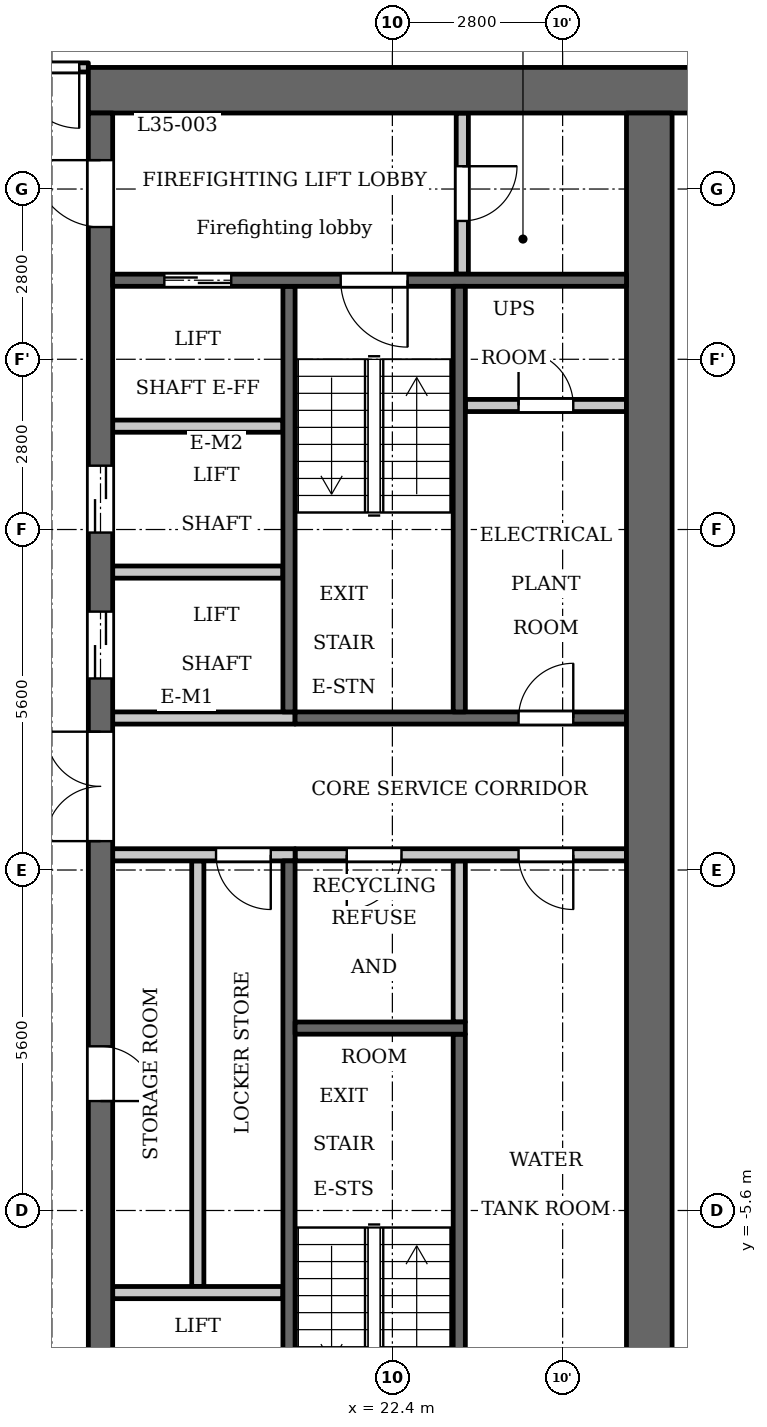
"""IFC4 building model, lengths in metres.
Left out: names, types, materials, properties, quantities, classifications, styles, units other than length and angle.
Written with IfcOpenShell. Run it as: python <this file> out.ifc"""

import sys

from ifc_helpers import new_model, si_unit, direction, frame, frame_2d, origin, place, context, subcontext, project, spatial, rectangle, extrude, element, fill, save


model = new_model("IFC4")
c1 = context("Model", 3, precision=1e-05, world=origin(), true_north=direction((0.0, 1.0)))
c2 = subcontext(c1, "Body", "Model", "MODEL_VIEW")
j1 = project(units=[si_unit("LENGTHUNIT", "METRE"), si_unit("PLANEANGLEUNIT", "RADIAN")], contexts=[c1])
p1 = place(None, origin())
s1 = spatial("IfcSite", under=j1, at=p1, CompositionType="ELEMENT")
p2 = place(p1, origin())
s2 = spatial("IfcBuilding", under=s1, at=p2, CompositionType="ELEMENT")
p3 = place(p2, frame((0.0, 0.0, 139.6)))
s3 = spatial("IfcBuildingStorey", under=s2, at=p3, CompositionType="ELEMENT", Elevation=139.6)
p4 = place(p3, frame((23.5, -2.5, 0.0), z_axis=(0.0, 0.0, 1.0), x_axis=(0.0, 1.0, 0.0)))
e1 = element("IfcWall", 1, at=p4, inside=s3, PredefinedType="PARTITIONING", context=c2, shape_type="SweptSolid", body=[
    extrude(rectangle(XDim=2.65, YDim=0.2, at=frame_2d((1.325, 0.0))), origin(), (0.0, 0.0, 1.0), 3.2),
])
p5 = place(p3, frame((20.7, 2.6, 0.0), z_axis=(0.0, 0.0, 1.0), x_axis=(0.0, 1.0, 0.0)))
e2 = element("IfcWall", 2, at=p5, inside=s3, PredefinedType="SHEAR", context=c2, shape_type="SweptSolid", body=[
    extrude(rectangle(XDim=7.0, YDim=0.2, at=frame_2d((3.5, 0.0))), origin(), (0.0, 0.0, 1.0), 3.2),
])
p6 = place(p3, frame((20.7, -9.6, 0.0), z_axis=(0.0, 0.0, 1.0), x_axis=(0.0, 1.0, 0.0)))
e3 = element("IfcWall", 3, at=p6, inside=s3, PredefinedType="SHEAR", context=c2, shape_type="SweptSolid", body=[
    extrude(rectangle(XDim=9.75, YDim=0.2, at=frame_2d((4.875, 0.0))), origin(), (0.0, 0.0, 1.0), 3.2),
])
p7 = place(p3, frame((20.8, 2.5, 0.0), z_axis=(0.0, 0.0, 1.0), x_axis=(1.0, 0.0, 0.0)))
e4 = element("IfcWall", 4, at=p7, inside=s3, PredefinedType="SHEAR", context=c2, shape_type="SweptSolid", body=[
    extrude(rectangle(XDim=5.45, YDim=0.2, at=frame_2d((2.725, 0.0))), origin(), (0.0, 0.0, 1.0), 3.2),
])
p8 = place(p7, frame((3.675, 0.0, 0.0)))
e5 = element("IfcOpeningElement", 5, at=p8, cuts=e4, PredefinedType="OPENING", context=c2, shape_type="SweptSolid", body=[
    extrude(rectangle(XDim=0.9, YDim=2.1, at=frame_2d((0.45, 1.05))), frame((0.0, 0.11, 0.0), z_axis=(0.0, -1.0, 0.0), x_axis=(1.0, 0.0, 0.0)), (0.0, 0.0, 1.0), 0.22),
])
p9 = place(p3, frame((20.8, 0.25, 0.0), z_axis=(0.0, 0.0, 1.0), x_axis=(1.0, 0.0, 0.0)))
e6 = element("IfcWall", 6, at=p9, inside=s3, PredefinedType="PARTITIONING", context=c2, shape_type="SweptSolid", body=[
    extrude(rectangle(XDim=5.45, YDim=0.2, at=frame_2d((2.725, 0.0))), origin(), (0.0, 0.0, 1.0), 3.2),
])
p10 = place(p9, frame((0.85, 0.0, 0.0)))
e7 = element("IfcOpeningElement", 7, at=p10, cuts=e6, PredefinedType="OPENING", context=c2, shape_type="SweptSolid", body=[
    extrude(rectangle(XDim=0.9, YDim=2.1, at=frame_2d((0.45, 1.05))), frame((0.0, 0.11, 0.0), z_axis=(0.0, -1.0, 0.0), x_axis=(1.0, 0.0, 0.0)), (0.0, 0.0, 1.0), 0.22),
])
p11 = place(p9, frame((3.675, 0.0, 0.0)))
e8 = element("IfcOpeningElement", 8, at=p11, cuts=e6, PredefinedType="OPENING", context=c2, shape_type="SweptSolid", body=[
    extrude(rectangle(XDim=0.9, YDim=2.1, at=frame_2d((0.45, 1.05))), frame((0.0, 0.11, 0.0), z_axis=(0.0, -1.0, 0.0), x_axis=(1.0, 0.0, 0.0)), (0.0, 0.0, 1.0), 0.22),
])
p12 = place(p3, frame((17.4, 12.825, 0.0), z_axis=(0.0, 0.0, 1.0), x_axis=(1.0, 0.0, 0.0)))
e9 = element("IfcWall", 9, at=p12, inside=s3, PredefinedType="SHEAR", context=c2, shape_type="SweptSolid", body=[
    extrude(rectangle(XDim=10.4, YDim=0.75, at=frame_2d((5.2, 0.0))), origin(), (0.0, 0.0, 1.0), 3.2),
])
p13 = place(p3, frame((19.2, -6.85, 0.0), z_axis=(0.0, 0.0, 1.0), x_axis=(0.0, 1.0, 0.0)))
e10 = element("IfcWall", 10, at=p13, inside=s3, PredefinedType="PARTITIONING", context=c2, shape_type="SweptSolid", body=[
    extrude(rectangle(XDim=7.0, YDim=0.2, at=frame_2d((3.5, 0.0))), origin(), (0.0, 0.0, 1.0), 3.2),
])
p14 = place(p3, frame((17.6, -12.45, 0.0), z_axis=(0.0, 0.0, 1.0), x_axis=(0.0, 1.0, 0.0)))
e11 = element("IfcWall", 11, at=p14, inside=s3, PredefinedType="SHEAR", context=c2, shape_type="SweptSolid", body=[
    extrude(rectangle(XDim=24.9, YDim=0.4, at=frame_2d((12.45, 0.0))), origin(), (0.0, 0.0, 1.0), 3.2),
])
p15 = place(p14, frame((8.65, 0.0, 0.0)))
e12 = element("IfcOpeningElement", 12, at=p15, cuts=e11, PredefinedType="OPENING", context=c2, shape_type="SweptSolid", body=[
    extrude(rectangle(XDim=0.9, YDim=2.1, at=frame_2d((0.45, 1.05))), frame((0.0, 0.21, 0.0), z_axis=(0.0, -1.0, 0.0), x_axis=(1.0, 0.0, 0.0)), (0.0, 0.0, 1.0), 0.42),
])
p16 = place(p14, frame((15.6, 0.0, 0.0)))
e13 = element("IfcOpeningElement", 13, at=p16, cuts=e11, PredefinedType="OPENING", context=c2, shape_type="SweptSolid", body=[
    extrude(rectangle(XDim=1.1, YDim=2.1, at=frame_2d((0.55, 1.05))), frame((0.0, 0.21, 0.0), z_axis=(0.0, -1.0, 0.0), x_axis=(1.0, 0.0, 0.0)), (0.0, 0.0, 1.0), 0.42),
])
p17 = place(p14, frame((18.0, 0.0, 0.0)))
e14 = element("IfcOpeningElement", 14, at=p17, cuts=e11, PredefinedType="OPENING", context=c2, shape_type="SweptSolid", body=[
    extrude(rectangle(XDim=1.1, YDim=2.1, at=frame_2d((0.55, 1.05))), frame((0.0, 0.21, 0.0), z_axis=(0.0, -1.0, 0.0), x_axis=(1.0, 0.0, 0.0)), (0.0, 0.0, 1.0), 0.42),
])
p18 = place(p14, frame((23.025, 0.0, 0.0)))
e15 = element("IfcOpeningElement", 15, at=p18, cuts=e11, PredefinedType="OPENING", context=c2, shape_type="SweptSolid", body=[
    extrude(rectangle(XDim=1.1, YDim=2.1, at=frame_2d((0.55, 1.05))), frame((0.0, 0.21, 0.0), z_axis=(0.0, -1.0, 0.0), x_axis=(1.0, 0.0, 0.0)), (0.0, 0.0, 1.0), 0.42),
])
p19 = place(p14, frame((0.775, 0.0, 0.0)))
e16 = element("IfcOpeningElement", 16, at=p19, cuts=e11, PredefinedType="OPENING", context=c2, shape_type="SweptSolid", body=[
    extrude(rectangle(XDim=1.1, YDim=2.1, at=frame_2d((0.55, 1.05))), frame((0.0, 0.21, 0.0), z_axis=(0.0, -1.0, 0.0), x_axis=(1.0, 0.0, 0.0)), (0.0, 0.0, 1.0), 0.42),
])
p20 = place(p14, frame((12.925, 0.0, 0.0)))
e17 = element("IfcOpeningElement", 17, at=p20, cuts=e11, PredefinedType="OPENING", context=c2, shape_type="SweptSolid", body=[
    extrude(rectangle(XDim=1.8, YDim=2.1, at=frame_2d((0.9, 1.05))), frame((0.0, 0.21, 0.0), z_axis=(0.0, -1.0, 0.0), x_axis=(1.0, 0.0, 0.0)), (0.0, 0.0, 1.0), 0.42),
])
p21 = place(p3, frame((26.625, -12.45, 0.0), z_axis=(0.0, 0.0, 1.0), x_axis=(0.0, 1.0, 0.0)))
e18 = element("IfcWall", 18, at=p21, inside=s3, PredefinedType="SHEAR", context=c2, shape_type="SweptSolid", body=[
    extrude(rectangle(XDim=24.9, YDim=0.75, at=frame_2d((12.45, 0.0))), origin(), (0.0, 0.0, 1.0), 3.2),
])
p22 = place(p3, frame((23.55, 9.8, 0.0), z_axis=(0.0, 0.0, 1.0), x_axis=(0.0, 1.0, 0.0)))
e19 = element("IfcWall", 19, at=p22, inside=s3, PredefinedType="PARTITIONING", context=c2, shape_type="SweptSolid", body=[
    extrude(rectangle(XDim=2.65, YDim=0.2, at=frame_2d((1.325, 0.0))), origin(), (0.0, 0.0, 1.0), 3.2),
])
p23 = place(p22, frame((0.875, 0.0, 0.0)))
e20 = element("IfcOpeningElement", 20, at=p23, cuts=e19, PredefinedType="OPENING", context=c2, shape_type="SweptSolid", body=[
    extrude(rectangle(XDim=0.9, YDim=2.1, at=frame_2d((0.45, 1.05))), frame((0.0, 0.11, 0.0), z_axis=(0.0, -1.0, 0.0), x_axis=(1.0, 0.0, 0.0)), (0.0, 0.0, 1.0), 0.22),
])
p24 = place(p3, frame((23.6, 7.64, 0.0), z_axis=(0.0, 0.0, 1.0), x_axis=(1.0, 0.0, 0.0)))
e21 = element("IfcWall", 21, at=p24, inside=s3, PredefinedType="PARTITIONING", context=c2, shape_type="SweptSolid", body=[
    extrude(rectangle(XDim=2.65, YDim=0.2, at=frame_2d((1.325, 0.0))), origin(), (0.0, 0.0, 1.0), 3.2),
])
p25 = place(p24, frame((0.875, 0.0, 0.0)))
e22 = element("IfcOpeningElement", 22, at=p25, cuts=e21, PredefinedType="OPENING", context=c2, shape_type="SweptSolid", body=[
    extrude(rectangle(XDim=0.9, YDim=2.1, at=frame_2d((0.45, 1.05))), frame((0.0, 0.11, 0.0), z_axis=(0.0, -1.0, 0.0), x_axis=(1.0, 0.0, 0.0)), (0.0, 0.0, 1.0), 0.22),
])
p26 = place(p3, frame((17.8, -6.95, 0.0), z_axis=(0.0, 0.0, 1.0), x_axis=(1.0, 0.0, 0.0)))
e23 = element("IfcWall", 23, at=p26, inside=s3, PredefinedType="PARTITIONING", context=c2, shape_type="SweptSolid", body=[
    extrude(rectangle(XDim=2.8, YDim=0.2, at=frame_2d((1.4, 0.0))), origin(), (0.0, 0.0, 1.0), 3.2),
])
p27 = place(p3, frame((17.8, 0.25, 0.0), z_axis=(0.0, 0.0, 1.0), x_axis=(1.0, 0.0, 0.0)))
e24 = element("IfcWall", 24, at=p27, inside=s3, PredefinedType="PARTITIONING", context=c2, shape_type="SweptSolid", body=[
    extrude(rectangle(XDim=3.0, YDim=0.2, at=frame_2d((1.5, 0.0))), origin(), (0.0, 0.0, 1.0), 3.2),
])
p28 = place(p27, frame((1.7, 0.0, 0.0)))
e25 = element("IfcOpeningElement", 25, at=p28, cuts=e24, PredefinedType="OPENING", context=c2, shape_type="SweptSolid", body=[
    extrude(rectangle(XDim=0.9, YDim=2.1, at=frame_2d((0.45, 1.05))), frame((0.0, 0.11, 0.0), z_axis=(0.0, -1.0, 0.0), x_axis=(1.0, 0.0, 0.0)), (0.0, 0.0, 1.0), 0.22),
])
p29 = place(p3, frame((17.8, 2.5, 0.0), z_axis=(0.0, 0.0, 1.0), x_axis=(1.0, 0.0, 0.0)))
e26 = element("IfcWall", 26, at=p29, inside=s3, PredefinedType="PARTITIONING", context=c2, shape_type="SweptSolid", body=[
    extrude(rectangle(XDim=3.0, YDim=0.2, at=frame_2d((1.5, 0.0))), origin(), (0.0, 0.0, 1.0), 3.2),
])
for number, where, z_axis, x_axis in (
    (27, (17.8, 4.9, 0.0), (0.0, 0.0, 1.0), (1.0, 0.0, 0.0)),
    (28, (17.8, 7.3, 0.0), (0.0, 0.0, 1.0), (1.0, 0.0, 0.0)),
):
    element("IfcWall", number, at=place(p3, frame(where, z_axis=z_axis, x_axis=x_axis)), inside=s3, PredefinedType="PARTITIONING", context=c2, shape_type="SweptSolid", body=[
        extrude(rectangle(XDim=2.8, YDim=0.2, at=frame_2d((1.4, 0.0))), origin(), (0.0, 0.0, 1.0), 3.2),
    ])
p30 = place(p3, frame((17.8, 9.7, 0.0), z_axis=(0.0, 0.0, 1.0), x_axis=(1.0, 0.0, 0.0)))
e29 = element("IfcWall", 29, at=p30, inside=s3, PredefinedType="SHEAR", context=c2, shape_type="SweptSolid", body=[
    extrude(rectangle(XDim=8.45, YDim=0.2, at=frame_2d((4.225, 0.0))), origin(), (0.0, 0.0, 1.0), 3.2),
])
p31 = place(p30, frame((0.85, 0.0, 0.0)))
e30 = element("IfcOpeningElement", 30, at=p31, cuts=e29, PredefinedType="OPENING", context=c2, shape_type="SweptSolid", body=[
    extrude(rectangle(XDim=1.1, YDim=2.1, at=frame_2d((0.55, 1.05))), frame((0.0, 0.11, 0.0), z_axis=(0.0, -1.0, 0.0), x_axis=(1.0, 0.0, 0.0)), (0.0, 0.0, 1.0), 0.22),
])
p32 = place(p30, frame((3.75, 0.0, 0.0)))
e31 = element("IfcOpeningElement", 31, at=p32, cuts=e29, PredefinedType="OPENING", context=c2, shape_type="SweptSolid", body=[
    extrude(rectangle(XDim=1.1, YDim=2.1, at=frame_2d((0.55, 1.05))), frame((0.0, 0.11, 0.0), z_axis=(0.0, -1.0, 0.0), x_axis=(1.0, 0.0, 0.0)), (0.0, 0.0, 1.0), 0.22),
])
p33 = place(p3, frame((23.5, 2.6, 0.0), z_axis=(0.0, 0.0, 1.0), x_axis=(0.0, 1.0, 0.0)))
e32 = element("IfcWall", 32, at=p33, inside=s3, PredefinedType="SHEAR", context=c2, shape_type="SweptSolid", body=[
    extrude(rectangle(XDim=7.0, YDim=0.2, at=frame_2d((3.5, 0.0))), origin(), (0.0, 0.0, 1.0), 3.2),
])
p34 = place(p3, frame((23.5, -9.6, 0.0), z_axis=(0.0, 0.0, 1.0), x_axis=(0.0, 1.0, 0.0)))
e33 = element("IfcWall", 33, at=p34, inside=s3, PredefinedType="SHEAR", context=c2, shape_type="SweptSolid", body=[
    extrude(rectangle(XDim=6.9, YDim=0.2, at=frame_2d((3.45, 0.0))), origin(), (0.0, 0.0, 1.0), 3.2),
])
p35 = place(p3, frame((20.8, -2.6, 0.0), z_axis=(0.0, 0.0, 1.0), x_axis=(1.0, 0.0, 0.0)))
e34 = element("IfcWall", 34, at=p35, inside=s3, PredefinedType="SHEAR", context=c2, shape_type="SweptSolid", body=[
    extrude(rectangle(XDim=2.8, YDim=0.2, at=frame_2d((1.4, 0.0))), origin(), (0.0, 0.0, 1.0), 3.2),
])
p36 = place(p3, frame((-17.4, 13.2, 0.0), z_axis=(0.0, 0.0, 1.0), x_axis=(1.0, 0.0, 0.0)))
e35 = element("IfcWall", 35, at=p36, inside=s3, PredefinedType="PARTITIONING", context=c2, shape_type="SweptSolid", body=[
    extrude(rectangle(XDim=34.8, YDim=0.15, at=frame_2d((17.4, 0.0))), origin(), (0.0, 0.0, 1.0), 3.2),
])
p37 = place(p36, frame((0.25, 0.0, 0.0)))
e36 = element("IfcOpeningElement", 36, at=p37, cuts=e35, PredefinedType="OPENING", context=c2, shape_type="SweptSolid", body=[
    extrude(rectangle(XDim=1.0, YDim=2.1, at=frame_2d((0.5, 1.05))), frame((0.0, 0.085, 0.0), z_axis=(0.0, -1.0, 0.0), x_axis=(1.0, 0.0, 0.0)), (0.0, 0.0, 1.0), 0.17),
])
p38 = place(p36, frame((33.65, 0.0, 0.0)))
e37 = element("IfcOpeningElement", 37, at=p38, cuts=e35, PredefinedType="OPENING", context=c2, shape_type="SweptSolid", body=[
    extrude(rectangle(XDim=1.0, YDim=2.1, at=frame_2d((0.5, 1.05))), frame((0.0, 0.085, 0.0), z_axis=(0.0, -1.0, 0.0), x_axis=(1.0, 0.0, 0.0)), (0.0, 0.0, 1.0), 0.17),
])
p39 = place(p36, frame((15.75, 0.0, 0.0)))
e38 = element("IfcOpeningElement", 38, at=p39, cuts=e35, PredefinedType="OPENING", context=c2, shape_type="SweptSolid", body=[
    extrude(rectangle(XDim=1.0, YDim=2.1, at=frame_2d((0.5, 1.05))), frame((0.0, 0.085, 0.0), z_axis=(0.0, -1.0, 0.0), x_axis=(1.0, 0.0, 0.0)), (0.0, 0.0, 1.0), 0.17),
])
p40 = place(p36, frame((19.35, 0.0, 0.0)))
e39 = element("IfcOpeningElement", 39, at=p40, cuts=e35, PredefinedType="OPENING", context=c2, shape_type="SweptSolid", body=[
    extrude(rectangle(XDim=1.0, YDim=2.1, at=frame_2d((0.5, 1.05))), frame((0.0, 0.085, 0.0), z_axis=(0.0, -1.0, 0.0), x_axis=(1.0, 0.0, 0.0)), (0.0, 0.0, 1.0), 0.17),
])
p41 = place(p36, frame((26.95, 0.0, 0.0)))
e40 = element("IfcOpeningElement", 40, at=p41, cuts=e35, PredefinedType="OPENING", context=c2, shape_type="SweptSolid", body=[
    extrude(rectangle(XDim=1.0, YDim=2.1, at=frame_2d((0.5, 1.05))), frame((0.0, 0.085, 0.0), z_axis=(0.0, -1.0, 0.0), x_axis=(1.0, 0.0, 0.0)), (0.0, 0.0, 1.0), 0.17),
])
p42 = place(p36, frame((29.75, 0.0, 0.0)))
e41 = element("IfcOpeningElement", 41, at=p42, cuts=e35, PredefinedType="OPENING", context=c2, shape_type="SweptSolid", body=[
    extrude(rectangle(XDim=1.0, YDim=2.1, at=frame_2d((0.5, 1.05))), frame((0.0, 0.085, 0.0), z_axis=(0.0, -1.0, 0.0), x_axis=(1.0, 0.0, 0.0)), (0.0, 0.0, 1.0), 0.17),
])
p43 = place(p15, origin())
e42 = element("IfcDoor", 42, at=p43, inside=s3, OperationType="SINGLE_SWING_LEFT", PredefinedType="DOOR", context=c2, shape_type="SweptSolid", body=[
    extrude(rectangle(XDim=0.9, YDim=2.1, at=frame_2d((0.45, 1.05))), frame((0.0, 0.025, 0.0), z_axis=(0.0, -1.0, 0.0), x_axis=(1.0, 0.0, 0.0)), (0.0, 0.0, 1.0), 0.05),
])
fill(e12, e42)
p44 = place(p28, origin())
e43 = element("IfcDoor", 43, at=p44, inside=s3, OperationType="SINGLE_SWING_RIGHT", PredefinedType="DOOR", context=c2, shape_type="SweptSolid", body=[
    extrude(rectangle(XDim=0.9, YDim=2.1, at=frame_2d((0.45, 1.05))), frame((0.0, 0.025, 0.0), z_axis=(0.0, -1.0, 0.0), x_axis=(1.0, 0.0, 0.0)), (0.0, 0.0, 1.0), 0.05),
])
fill(e25, e43)
p45 = place(p16, origin())
e44 = element("IfcDoor", 44, at=p45, inside=s3, OperationType="DOUBLE_DOOR_SLIDING", PredefinedType="DOOR", context=c2, shape_type="SweptSolid", body=[
    extrude(rectangle(XDim=1.1, YDim=2.1, at=frame_2d((0.55, 1.05))), frame((0.0, 0.025, 0.0), z_axis=(0.0, -1.0, 0.0), x_axis=(1.0, 0.0, 0.0)), (0.0, 0.0, 1.0), 0.05),
])
fill(e13, e44)
p46 = place(p17, origin())
e45 = element("IfcDoor", 45, at=p46, inside=s3, OperationType="DOUBLE_DOOR_SLIDING", PredefinedType="DOOR", context=c2, shape_type="SweptSolid", body=[
    extrude(rectangle(XDim=1.1, YDim=2.1, at=frame_2d((0.55, 1.05))), frame((0.0, 0.025, 0.0), z_axis=(0.0, -1.0, 0.0), x_axis=(1.0, 0.0, 0.0)), (0.0, 0.0, 1.0), 0.05),
])
fill(e14, e45)
p47 = place(p31, origin())
e46 = element("IfcDoor", 46, at=p47, inside=s3, OperationType="DOUBLE_DOOR_SLIDING", PredefinedType="DOOR", context=c2, shape_type="SweptSolid", body=[
    extrude(rectangle(XDim=1.1, YDim=2.1, at=frame_2d((0.55, 1.05))), frame((0.0, 0.025, 0.0), z_axis=(0.0, -1.0, 0.0), x_axis=(1.0, 0.0, 0.0)), (0.0, 0.0, 1.0), 0.05),
])
fill(e30, e46)
p48 = place(p18, origin())
e47 = element("IfcDoor", 47, at=p48, inside=s3, OperationType="SINGLE_SWING_LEFT", PredefinedType="DOOR", context=c2, shape_type="SweptSolid", body=[
    extrude(rectangle(XDim=1.1, YDim=2.1, at=frame_2d((0.55, 1.05))), frame((0.0, 0.025, 0.0), z_axis=(0.0, -1.0, 0.0), x_axis=(1.0, 0.0, 0.0)), (0.0, 0.0, 1.0), 0.05),
])
fill(e15, e47)
p49 = place(p23, origin())
e48 = element("IfcDoor", 48, at=p49, inside=s3, OperationType="SINGLE_SWING_RIGHT", PredefinedType="DOOR", context=c2, shape_type="SweptSolid", body=[
    extrude(rectangle(XDim=0.9, YDim=2.1, at=frame_2d((0.45, 1.05))), frame((0.0, 0.025, 0.0), z_axis=(0.0, -1.0, 0.0), x_axis=(1.0, 0.0, 0.0)), (0.0, 0.0, 1.0), 0.05),
])
fill(e20, e48)
p50 = place(p32, origin())
e49 = element("IfcDoor", 49, at=p50, inside=s3, OperationType="SINGLE_SWING_RIGHT", PredefinedType="DOOR", context=c2, shape_type="SweptSolid", body=[
    extrude(rectangle(XDim=1.1, YDim=2.1, at=frame_2d((0.55, 1.05))), frame((0.0, 0.025, 0.0), z_axis=(0.0, -1.0, 0.0), x_axis=(1.0, 0.0, 0.0)), (0.0, 0.0, 1.0), 0.05),
])
fill(e31, e49)
p51 = place(p20, origin())
e50 = element("IfcDoor", 50, at=p51, inside=s3, OperationType="DOUBLE_DOOR_SINGLE_SWING", PredefinedType="DOOR", context=c2, shape_type="SweptSolid", body=[
    extrude(rectangle(XDim=1.8, YDim=2.1, at=frame_2d((0.9, 1.05))), frame((0.0, 0.025, 0.0), z_axis=(0.0, -1.0, 0.0), x_axis=(1.0, 0.0, 0.0)), (0.0, 0.0, 1.0), 0.05),
])
fill(e17, e50)
p52 = place(p10, origin())
e51 = element("IfcDoor", 51, at=p52, inside=s3, OperationType="SINGLE_SWING_LEFT", PredefinedType="DOOR", context=c2, shape_type="SweptSolid", body=[
    extrude(rectangle(XDim=0.9, YDim=2.1, at=frame_2d((0.45, 1.05))), frame((0.0, 0.025, 0.0), z_axis=(0.0, -1.0, 0.0), x_axis=(1.0, 0.0, 0.0)), (0.0, 0.0, 1.0), 0.05),
])
fill(e7, e51)
p53 = place(p11, origin())
e52 = element("IfcDoor", 52, at=p53, inside=s3, OperationType="SINGLE_SWING_RIGHT", PredefinedType="DOOR", context=c2, shape_type="SweptSolid", body=[
    extrude(rectangle(XDim=0.9, YDim=2.1, at=frame_2d((0.45, 1.05))), frame((0.0, 0.025, 0.0), z_axis=(0.0, -1.0, 0.0), x_axis=(1.0, 0.0, 0.0)), (0.0, 0.0, 1.0), 0.05),
])
fill(e8, e52)
p54 = place(p25, origin())
e53 = element("IfcDoor", 53, at=p54, inside=s3, OperationType="SINGLE_SWING_RIGHT", PredefinedType="DOOR", context=c2, shape_type="SweptSolid", body=[
    extrude(rectangle(XDim=0.9, YDim=2.1, at=frame_2d((0.45, 1.05))), frame((0.0, 0.025, 0.0), z_axis=(0.0, -1.0, 0.0), x_axis=(1.0, 0.0, 0.0)), (0.0, 0.0, 1.0), 0.05),
])
fill(e22, e53)
p55 = place(p8, origin())
e54 = element("IfcDoor", 54, at=p55, inside=s3, OperationType="SINGLE_SWING_LEFT", PredefinedType="DOOR", context=c2, shape_type="SweptSolid", body=[
    extrude(rectangle(XDim=0.9, YDim=2.1, at=frame_2d((0.45, 1.05))), frame((0.0, 0.025, 0.0), z_axis=(0.0, -1.0, 0.0), x_axis=(1.0, 0.0, 0.0)), (0.0, 0.0, 1.0), 0.05),
])
fill(e5, e54)
p56 = place(p38, origin())
e55 = element("IfcDoor", 55, at=p56, inside=s3, OperationType="SINGLE_SWING_RIGHT", PredefinedType="DOOR", context=c2, shape_type="SweptSolid", body=[
    extrude(rectangle(XDim=1.0, YDim=2.1, at=frame_2d((0.5, 1.05))), frame((0.0, 0.025, 0.0), z_axis=(0.0, -1.0, 0.0), x_axis=(1.0, 0.0, 0.0)), (0.0, 0.0, 1.0), 0.05),
])
fill(e37, e55)
save(model, sys.argv[1])
